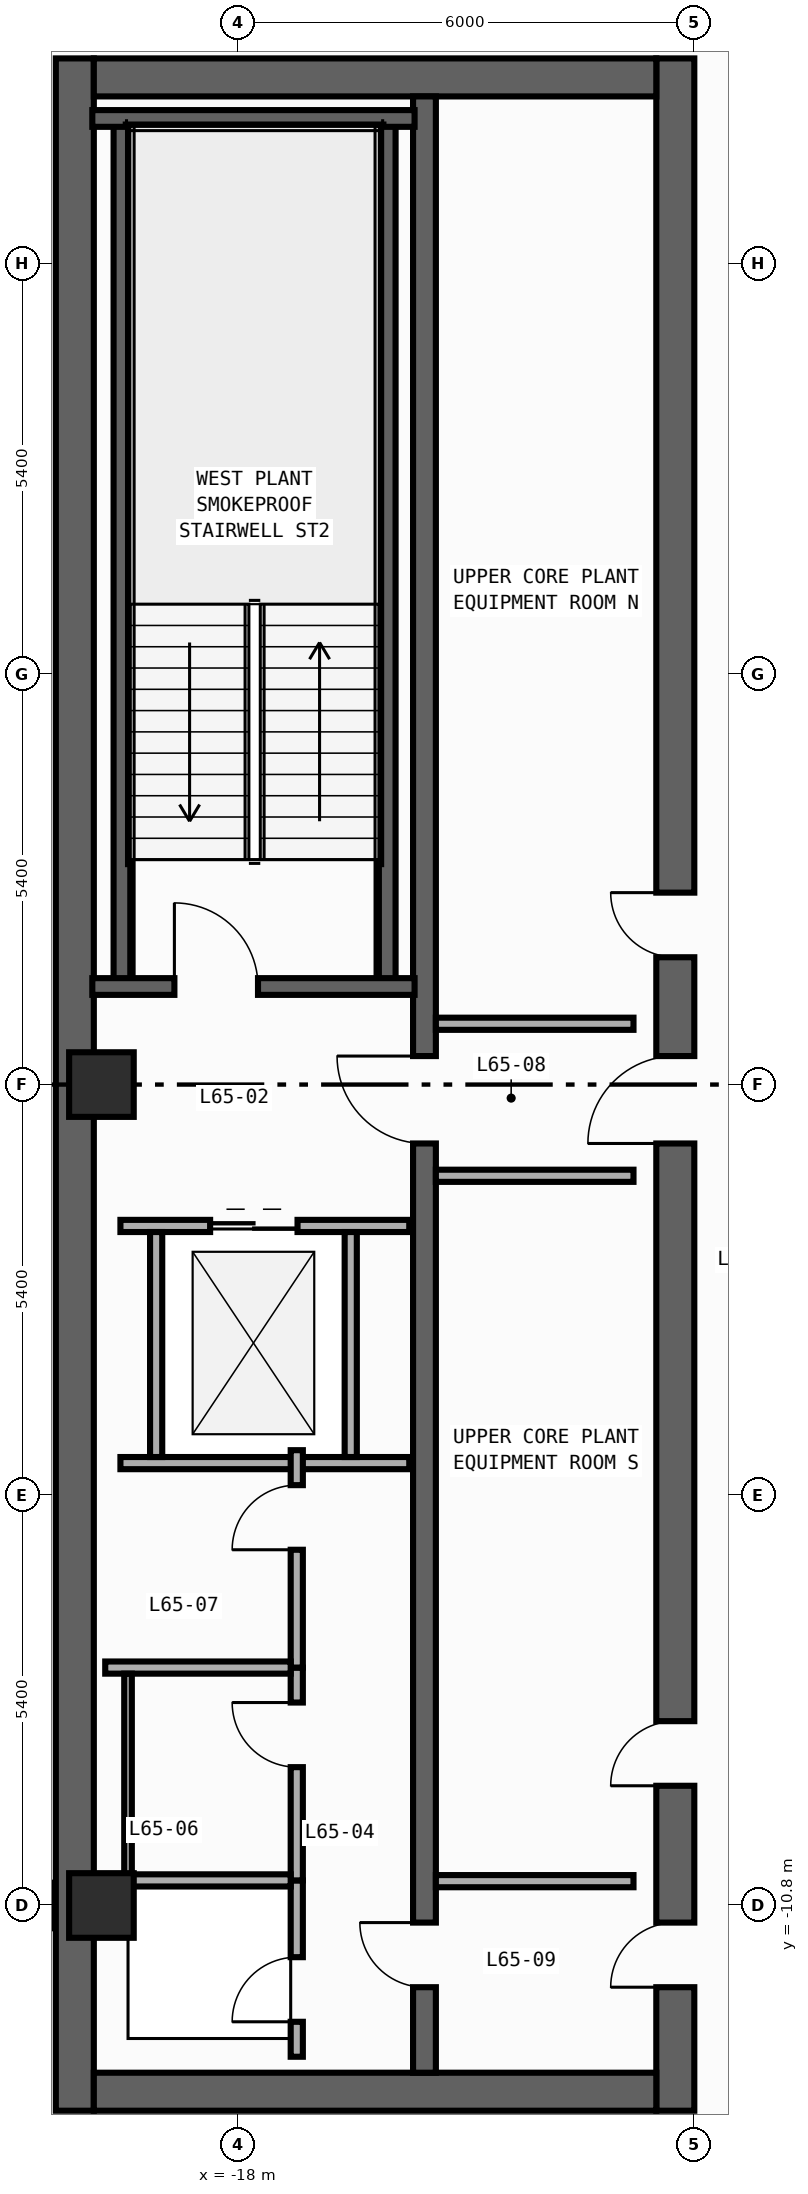
"""IFC4 building model, lengths in metres.
Left out: names, types, materials, properties, quantities, classifications, styles, units other than length and angle.
Written with IfcOpenShell. Run it as: python <this file> out.ifc"""

import sys

from ifc_helpers import new_model, si_unit, direction, frame, frame_2d, origin, origin_2d, place, context, subcontext, project, spatial, rectangle, extrude, element, fill, save


model = new_model("IFC4")
c1 = context("Model", 3, precision=1e-05, world=origin(), true_north=direction((0.0, 1.0)))
c2 = subcontext(c1, "Body", "Model", "MODEL_VIEW")
j1 = project(units=[si_unit("LENGTHUNIT", "METRE"), si_unit("PLANEANGLEUNIT", "RADIAN")], contexts=[c1])
p1 = place(None, origin())
s1 = spatial("IfcSite", under=j1, at=p1, CompositionType="ELEMENT")
p2 = place(p1, origin())
s2 = spatial("IfcBuilding", under=s1, at=p2, CompositionType="ELEMENT")
p3 = place(p2, frame((0.0, 0.0, 272.8)))
s3 = spatial("IfcBuildingStorey", under=s2, at=p3, CompositionType="ELEMENT", Elevation=272.8)
p4 = place(p3, frame((-20.15, -13.5, 0.0), z_axis=(0.0, 0.0, 1.0), x_axis=(0.0, 1.0, 0.0)))
e1 = element("IfcWall", 1, at=p4, inside=s3, PredefinedType="SHEAR", context=c2, shape_type="SweptSolid", body=[
    extrude(rectangle(XDim=27.0, YDim=0.5, at=frame_2d((13.5, 0.0))), origin(), (0.0, 0.0, 1.0), 4.54),
])
p5 = place(p3, frame((-12.25, -13.5, 0.0), z_axis=(0.0, 0.0, 1.0), x_axis=(0.0, 1.0, 0.0)))
e2 = element("IfcWall", 2, at=p5, inside=s3, PredefinedType="SHEAR", context=c2, shape_type="SweptSolid", body=[
    extrude(rectangle(XDim=27.0, YDim=0.5, at=frame_2d((13.5, 0.0))), origin(), (0.0, 0.0, 1.0), 4.54),
])
p6 = place(p5, frame((15.175, 0.0, 0.0)))
e3 = element("IfcOpeningElement", 3, at=p6, cuts=e2, PredefinedType="OPENING", context=c2, shape_type="SweptSolid", body=[
    extrude(rectangle(XDim=0.85, YDim=2.1, at=frame_2d((0.425, 1.05))), frame((0.0, 0.26, 0.0), z_axis=(0.0, -1.0, 0.0), x_axis=(1.0, 0.0, 0.0)), (0.0, 0.0, 1.0), 0.52),
])
p7 = place(p5, frame((4.275, 0.0, 0.0)))
e4 = element("IfcOpeningElement", 4, at=p7, cuts=e2, PredefinedType="OPENING", context=c2, shape_type="SweptSolid", body=[
    extrude(rectangle(XDim=0.85, YDim=2.1, at=frame_2d((0.425, 1.05))), frame((0.0, 0.26, 0.0), z_axis=(0.0, -1.0, 0.0), x_axis=(1.0, 0.0, 0.0)), (0.0, 0.0, 1.0), 0.52),
])
p8 = place(p5, frame((12.725, 0.0, 0.0)))
e5 = element("IfcOpeningElement", 5, at=p8, cuts=e2, PredefinedType="OPENING", context=c2, shape_type="SweptSolid", body=[
    extrude(rectangle(XDim=1.15, YDim=2.2, at=frame_2d((0.575, 1.1))), frame((0.0, 0.26, 0.0), z_axis=(0.0, -1.0, 0.0), x_axis=(1.0, 0.0, 0.0)), (0.0, 0.0, 1.0), 0.52),
])
p9 = place(p5, frame((1.625, 0.0, 0.0)))
e6 = element("IfcOpeningElement", 6, at=p9, cuts=e2, PredefinedType="OPENING", context=c2, shape_type="SweptSolid", body=[
    extrude(rectangle(XDim=0.85, YDim=2.1, at=frame_2d((0.425, 1.05))), frame((0.0, 0.26, 0.0), z_axis=(0.0, -1.0, 0.0), x_axis=(1.0, 0.0, 0.0)), (0.0, 0.0, 1.0), 0.52),
])
for number, where, z_axis, x_axis in (
    (7, (-19.9, -13.25, 0.0), (0.0, 0.0, 1.0), (1.0, 0.0, 0.0)),
    (8, (-19.9, 13.25, 0.0), (0.0, 0.0, 1.0), (1.0, 0.0, 0.0)),
):
    element("IfcWall", number, at=place(p3, frame(where, z_axis=z_axis, x_axis=x_axis)), inside=s3, PredefinedType="SHEAR", context=c2, shape_type="SweptSolid", body=[
        extrude(rectangle(XDim=7.4, YDim=0.5, at=frame_2d((3.7, 0.0))), origin(), (0.0, 0.0, 1.0), 4.54),
    ])
p10 = place(p3, frame((-15.55, -13.0, 0.0), z_axis=(0.0, 0.0, 1.0), x_axis=(0.0, 1.0, 0.0)))
e9 = element("IfcWall", 9, at=p10, inside=s3, PredefinedType="SHEAR", context=c2, shape_type="SweptSolid", body=[
    extrude(rectangle(XDim=26.0, YDim=0.3, at=frame_2d((13.0, 0.0))), origin(), (0.0, 0.0, 1.0), 4.54),
])
p11 = place(p10, frame((12.225, 0.0, 0.0)))
e10 = element("IfcOpeningElement", 10, at=p11, cuts=e9, PredefinedType="OPENING", context=c2, shape_type="SweptSolid", body=[
    extrude(rectangle(XDim=1.15, YDim=2.2, at=frame_2d((0.575, 1.1))), frame((0.0, 0.16, 0.0), z_axis=(0.0, -1.0, 0.0), x_axis=(1.0, 0.0, 0.0)), (0.0, 0.0, 1.0), 0.32),
])
p12 = place(p10, frame((1.125, 0.0, 0.0)))
e11 = element("IfcOpeningElement", 11, at=p12, cuts=e9, PredefinedType="OPENING", context=c2, shape_type="SweptSolid", body=[
    extrude(rectangle(XDim=0.85, YDim=2.1, at=frame_2d((0.425, 1.05))), frame((0.0, 0.16, 0.0), z_axis=(0.0, -1.0, 0.0), x_axis=(1.0, 0.0, 0.0)), (0.0, 0.0, 1.0), 0.32),
])
for number, where, z_axis, x_axis in (
    (12, (-16.04, 1.29, 0.0), (0.0, 0.0, 1.0), (0.0, 1.0, 0.0)),
    (13, (-19.53, 1.29, 0.0), (0.0, 0.0, 1.0), (0.0, 1.0, 0.0)),
):
    element("IfcWall", number, at=place(p3, frame(where, z_axis=z_axis, x_axis=x_axis)), inside=s3, PredefinedType="SHEAR", context=c2, shape_type="SweptSolid", body=[
        extrude(rectangle(XDim=11.42, YDim=0.22, at=frame_2d((5.71, 0.0))), origin(), (0.0, 0.0, 1.0), 4.54),
    ])
p13 = place(p3, frame((-19.92, 12.71, 0.0), z_axis=(0.0, 0.0, 1.0), x_axis=(1.0, 0.0, 0.0)))
e14 = element("IfcWall", 14, at=p13, inside=s3, PredefinedType="SHEAR", context=c2, shape_type="SweptSolid", body=[
    extrude(rectangle(XDim=4.24, YDim=0.22, at=frame_2d((2.12, 0.0))), origin(), (0.0, 0.0, 1.0), 4.54),
])
p14 = place(p3, frame((-19.92, 1.29, 0.0), z_axis=(0.0, 0.0, 1.0), x_axis=(1.0, 0.0, 0.0)))
e15 = element("IfcWall", 15, at=p14, inside=s3, PredefinedType="SHEAR", context=c2, shape_type="SweptSolid", body=[
    extrude(rectangle(XDim=4.24, YDim=0.22, at=frame_2d((2.12, 0.0))), origin(), (0.0, 0.0, 1.0), 4.54),
])
p15 = place(p14, frame((1.08, 0.0, 0.0)))
e16 = element("IfcOpeningElement", 16, at=p15, cuts=e15, PredefinedType="OPENING", context=c2, shape_type="SweptSolid", body=[
    extrude(rectangle(XDim=1.1, YDim=2.2, at=frame_2d((0.55, 1.1))), frame((0.0, 0.12, 0.0), z_axis=(0.0, -1.0, 0.0), x_axis=(1.0, 0.0, 0.0)), (0.0, 0.0, 1.0), 0.24),
])
for number, where, z_axis, x_axis in (
    (17, (-19.8, -10.8, 0.0), (0.0, 0.0, 1.0), (1.0, 0.0, 0.0)),
    (18, (-19.8, 0.0, 0.0), (0.0, 0.0, 1.0), (1.0, 0.0, 0.0)),
):
    element("IfcColumn", number, at=place(p3, frame(where, z_axis=z_axis, x_axis=x_axis)), inside=s3, PredefinedType="COLUMN", context=c2, shape_type="SweptSolid", body=[
        extrude(rectangle(XDim=0.85, YDim=0.85, at=origin_2d()), origin(), (0.0, 0.0, 1.0), 4.8),
    ])
p16 = place(p3, frame((-21.0, -10.8, 0.0), z_axis=(0.0, 0.0, 1.0), x_axis=(1.0, 0.0, 0.0)))
e19 = element("IfcWall", 19, at=p16, inside=s3, PredefinedType="SHEAR", context=c2, shape_type="SweptSolid", body=[
    extrude(rectangle(XDim=0.58, YDim=0.6, at=frame_2d((0.29, 0.0))), origin(), (0.0, 0.0, 1.0), 4.54),
])
p17 = place(p3, frame((-19.55, -1.86, 0.0), z_axis=(0.0, 0.0, 1.0), x_axis=(1.0, 0.0, 0.0)))
e20 = element("IfcWall", 20, at=p17, inside=s3, PredefinedType="STANDARD", context=c2, shape_type="SweptSolid", body=[
    extrude(rectangle(XDim=3.8, YDim=0.16, at=frame_2d((1.9, 0.0))), origin(), (0.0, 0.0, 1.0), 4.54),
])
p18 = place(p17, frame((1.18, 0.0, 0.0)))
e21 = element("IfcOpeningElement", 21, at=p18, cuts=e20, PredefinedType="OPENING", context=c2, shape_type="SweptSolid", body=[
    extrude(rectangle(XDim=1.15, YDim=2.2, at=frame_2d((0.575, 1.1))), frame((0.0, 0.09, 0.0), z_axis=(0.0, -1.0, 0.0), x_axis=(1.0, 0.0, 0.0)), (0.0, 0.0, 1.0), 0.18),
])
p19 = place(p3, frame((-19.55, -4.98, 0.0), z_axis=(0.0, 0.0, 1.0), x_axis=(1.0, 0.0, 0.0)))
e22 = element("IfcWall", 22, at=p19, inside=s3, PredefinedType="STANDARD", context=c2, shape_type="SweptSolid", body=[
    extrude(rectangle(XDim=3.8, YDim=0.16, at=frame_2d((1.9, 0.0))), origin(), (0.0, 0.0, 1.0), 4.54),
])
for number, where, z_axis, x_axis in (
    (23, (-19.08, -4.9, 0.0), (0.0, 0.0, 1.0), (0.0, 1.0, 0.0)),
    (24, (-16.52, -4.9, 0.0), (0.0, 0.0, 1.0), (0.0, 1.0, 0.0)),
):
    element("IfcWall", number, at=place(p3, frame(where, z_axis=z_axis, x_axis=x_axis)), inside=s3, PredefinedType="STANDARD", context=c2, shape_type="SweptSolid", body=[
        extrude(rectangle(XDim=2.96, YDim=0.16, at=frame_2d((1.48, 0.0))), origin(), (0.0, 0.0, 1.0), 4.54),
    ])
for number, where, z_axis, x_axis in (
    (25, (-15.4, 0.8, 0.0), (0.0, 0.0, 1.0), (1.0, 0.0, 0.0)),
    (26, (-15.4, -1.2, 0.0), (0.0, 0.0, 1.0), (1.0, 0.0, 0.0)),
    (27, (-15.4, -10.48, 0.0), (0.0, 0.0, 1.0), (1.0, 0.0, 0.0)),
):
    element("IfcWall", number, at=place(p3, frame(where, z_axis=z_axis, x_axis=x_axis)), inside=s3, PredefinedType="STANDARD", context=c2, shape_type="SweptSolid", body=[
        extrude(rectangle(XDim=2.6, YDim=0.16, at=frame_2d((1.3, 0.0))), origin(), (0.0, 0.0, 1.0), 4.54),
    ])
p20 = place(p3, frame((-17.23, -12.79, 0.0), z_axis=(0.0, 0.0, 1.0), x_axis=(0.0, 1.0, 0.0)))
e28 = element("IfcWall", 28, at=p20, inside=s3, PredefinedType="PARTITIONING", context=c2, shape_type="SweptSolid", body=[
    extrude(rectangle(XDim=2.32, YDim=0.16, at=frame_2d((1.16, 0.0))), origin(), (0.0, 0.0, 1.0), 4.54),
])
p21 = place(p20, frame((0.46, 0.0, 0.0)))
e29 = element("IfcOpeningElement", 29, at=p21, cuts=e28, PredefinedType="OPENING", context=c2, shape_type="SweptSolid", body=[
    extrude(rectangle(XDim=0.85, YDim=2.1, at=frame_2d((0.425, 1.05))), frame((0.0, 0.09, 0.0), z_axis=(0.0, -1.0, 0.0), x_axis=(1.0, 0.0, 0.0)), (0.0, 0.0, 1.0), 0.18),
])
p22 = place(p3, frame((-17.23, -10.47, 0.0), z_axis=(0.0, 0.0, 1.0), x_axis=(0.0, 1.0, 0.0)))
e30 = element("IfcWall", 30, at=p22, inside=s3, PredefinedType="PARTITIONING", context=c2, shape_type="SweptSolid", body=[
    extrude(rectangle(XDim=2.8, YDim=0.16, at=frame_2d((1.4, 0.0))), origin(), (0.0, 0.0, 1.0), 4.54),
])
p23 = place(p22, frame((1.49, 0.0, 0.0)))
e31 = element("IfcOpeningElement", 31, at=p23, cuts=e30, PredefinedType="OPENING", context=c2, shape_type="SweptSolid", body=[
    extrude(rectangle(XDim=0.85, YDim=2.1, at=frame_2d((0.425, 1.05))), frame((0.0, 0.09, 0.0), z_axis=(0.0, -1.0, 0.0), x_axis=(1.0, 0.0, 0.0)), (0.0, 0.0, 1.0), 0.18),
])
p24 = place(p3, frame((-17.23, -7.67, 0.0), z_axis=(0.0, 0.0, 1.0), x_axis=(0.0, 1.0, 0.0)))
e32 = element("IfcWall", 32, at=p24, inside=s3, PredefinedType="PARTITIONING", context=c2, shape_type="SweptSolid", body=[
    extrude(rectangle(XDim=2.86, YDim=0.16, at=frame_2d((1.43, 0.0))), origin(), (0.0, 0.0, 1.0), 4.54),
])
p25 = place(p24, frame((1.55, 0.0, 0.0)))
e33 = element("IfcOpeningElement", 33, at=p25, cuts=e32, PredefinedType="OPENING", context=c2, shape_type="SweptSolid", body=[
    extrude(rectangle(XDim=0.85, YDim=2.1, at=frame_2d((0.425, 1.05))), frame((0.0, 0.09, 0.0), z_axis=(0.0, -1.0, 0.0), x_axis=(1.0, 0.0, 0.0)), (0.0, 0.0, 1.0), 0.18),
])
for number, where, z_axis, x_axis in (
    (34, (-19.75, -10.47, 0.0), (0.0, 0.0, 1.0), (1.0, 0.0, 0.0)),
    (35, (-19.75, -7.67, 0.0), (0.0, 0.0, 1.0), (1.0, 0.0, 0.0)),
):
    element("IfcWall", number, at=place(p3, frame(where, z_axis=z_axis, x_axis=x_axis)), inside=s3, PredefinedType="PARTITIONING", context=c2, shape_type="SweptSolid", body=[
        extrude(rectangle(XDim=2.44, YDim=0.16, at=frame_2d((1.22, 0.0))), origin(), (0.0, 0.0, 1.0), 4.54),
    ])
p26 = place(p3, frame((-19.45, -10.39, 0.0), z_axis=(0.0, 0.0, 1.0), x_axis=(0.0, 1.0, 0.0)))
e36 = element("IfcWall", 36, at=p26, inside=s3, PredefinedType="PARTITIONING", context=c2, shape_type="SweptSolid", body=[
    extrude(rectangle(XDim=2.64, YDim=0.1, at=frame_2d((1.32, 0.0))), origin(), (0.0, 0.0, 1.0), 4.54),
])
p27 = place(p15, origin())
e37 = element("IfcDoor", 37, at=p27, inside=s3, OperationType="SINGLE_SWING_LEFT", PredefinedType="DOOR", context=c2, shape_type="SweptSolid", body=[
    extrude(rectangle(XDim=1.1, YDim=2.2, at=frame_2d((0.55, 1.1))), frame((0.0, 0.025, 0.0), z_axis=(0.0, -1.0, 0.0), x_axis=(1.0, 0.0, 0.0)), (0.0, 0.0, 1.0), 0.05),
])
fill(e16, e37)
p28 = place(p6, origin())
e38 = element("IfcDoor", 38, at=p28, inside=s3, OperationType="SINGLE_SWING_RIGHT", PredefinedType="DOOR", context=c2, shape_type="SweptSolid", body=[
    extrude(rectangle(XDim=0.85, YDim=2.1, at=frame_2d((0.425, 1.05))), frame((0.0, 0.025, 0.0), z_axis=(0.0, -1.0, 0.0), x_axis=(1.0, 0.0, 0.0)), (0.0, 0.0, 1.0), 0.05),
])
fill(e3, e38)
p29 = place(p7, origin())
e39 = element("IfcDoor", 39, at=p29, inside=s3, OperationType="SINGLE_SWING_LEFT", PredefinedType="DOOR", context=c2, shape_type="SweptSolid", body=[
    extrude(rectangle(XDim=0.85, YDim=2.1, at=frame_2d((0.425, 1.05))), frame((0.0, 0.025, 0.0), z_axis=(0.0, -1.0, 0.0), x_axis=(1.0, 0.0, 0.0)), (0.0, 0.0, 1.0), 0.05),
])
fill(e4, e39)
p30 = place(p8, origin())
e40 = element("IfcDoor", 40, at=p30, inside=s3, OperationType="SINGLE_SWING_LEFT", PredefinedType="DOOR", context=c2, shape_type="SweptSolid", body=[
    extrude(rectangle(XDim=1.15, YDim=2.2, at=frame_2d((0.575, 1.1))), frame((0.0, 0.025, 0.0), z_axis=(0.0, -1.0, 0.0), x_axis=(1.0, 0.0, 0.0)), (0.0, 0.0, 1.0), 0.05),
])
fill(e5, e40)
p31 = place(p11, origin())
e41 = element("IfcDoor", 41, at=p31, inside=s3, OperationType="SINGLE_SWING_RIGHT", PredefinedType="DOOR", context=c2, shape_type="SweptSolid", body=[
    extrude(rectangle(XDim=1.15, YDim=2.2, at=frame_2d((0.575, 1.1))), frame((0.0, 0.025, 0.0), z_axis=(0.0, -1.0, 0.0), x_axis=(1.0, 0.0, 0.0)), (0.0, 0.0, 1.0), 0.05),
])
fill(e10, e41)
p32 = place(p9, origin())
e42 = element("IfcDoor", 42, at=p32, inside=s3, OperationType="SINGLE_SWING_LEFT", PredefinedType="DOOR", context=c2, shape_type="SweptSolid", body=[
    extrude(rectangle(XDim=0.85, YDim=2.1, at=frame_2d((0.425, 1.05))), frame((0.0, 0.025, 0.0), z_axis=(0.0, -1.0, 0.0), x_axis=(1.0, 0.0, 0.0)), (0.0, 0.0, 1.0), 0.05),
])
fill(e6, e42)
p33 = place(p12, origin())
e43 = element("IfcDoor", 43, at=p33, inside=s3, OperationType="SINGLE_SWING_RIGHT", PredefinedType="DOOR", context=c2, shape_type="SweptSolid", body=[
    extrude(rectangle(XDim=0.85, YDim=2.1, at=frame_2d((0.425, 1.05))), frame((0.0, 0.025, 0.0), z_axis=(0.0, -1.0, 0.0), x_axis=(1.0, 0.0, 0.0)), (0.0, 0.0, 1.0), 0.05),
])
fill(e11, e43)
p34 = place(p18, origin())
e44 = element("IfcDoor", 44, at=p34, inside=s3, OperationType="DOUBLE_DOOR_SLIDING", PredefinedType="DOOR", context=c2, shape_type="SweptSolid", body=[
    extrude(rectangle(XDim=1.15, YDim=2.2, at=frame_2d((0.575, 1.1))), frame((0.0, 0.025, 0.0), z_axis=(0.0, -1.0, 0.0), x_axis=(1.0, 0.0, 0.0)), (0.0, 0.0, 1.0), 0.05),
])
fill(e21, e44)
p35 = place(p21, origin())
e45 = element("IfcDoor", 45, at=p35, inside=s3, OperationType="SINGLE_SWING_LEFT", PredefinedType="DOOR", context=c2, shape_type="SweptSolid", body=[
    extrude(rectangle(XDim=0.85, YDim=2.1, at=frame_2d((0.425, 1.05))), frame((0.0, 0.025, 0.0), z_axis=(0.0, -1.0, 0.0), x_axis=(1.0, 0.0, 0.0)), (0.0, 0.0, 1.0), 0.05),
])
fill(e29, e45)
p36 = place(p23, origin())
e46 = element("IfcDoor", 46, at=p36, inside=s3, OperationType="SINGLE_SWING_RIGHT", PredefinedType="DOOR", context=c2, shape_type="SweptSolid", body=[
    extrude(rectangle(XDim=0.85, YDim=2.1, at=frame_2d((0.425, 1.05))), frame((0.0, 0.025, 0.0), z_axis=(0.0, -1.0, 0.0), x_axis=(1.0, 0.0, 0.0)), (0.0, 0.0, 1.0), 0.05),
])
fill(e31, e46)
p37 = place(p25, origin())
e47 = element("IfcDoor", 47, at=p37, inside=s3, OperationType="SINGLE_SWING_LEFT", PredefinedType="DOOR", context=c2, shape_type="SweptSolid", body=[
    extrude(rectangle(XDim=0.85, YDim=2.1, at=frame_2d((0.425, 1.05))), frame((0.0, 0.025, 0.0), z_axis=(0.0, -1.0, 0.0), x_axis=(1.0, 0.0, 0.0)), (0.0, 0.0, 1.0), 0.05),
])
fill(e33, e47)
save(model, sys.argv[1])
